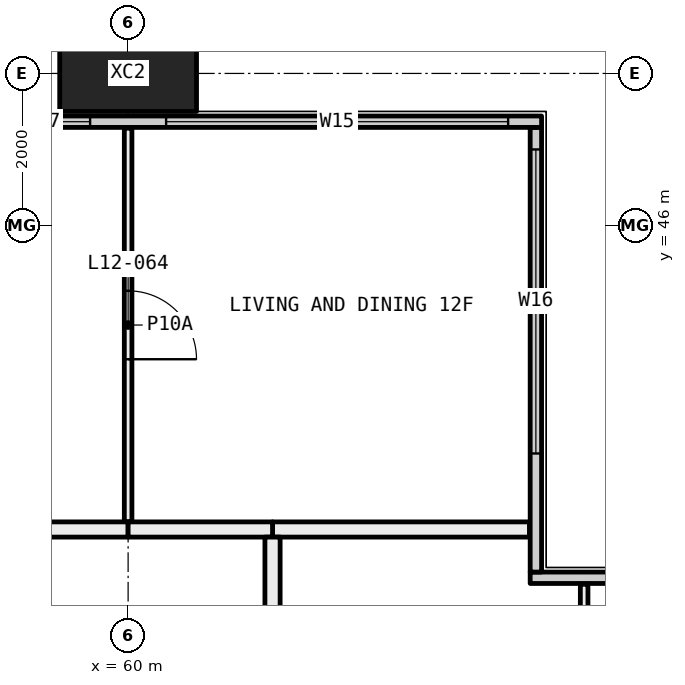
"""IFC4 building model, lengths in metres.
Left out: names, types, materials, properties, quantities, classifications, styles, units other than length and angle.
Written with IfcOpenShell. Run it as: python <this file> out.ifc"""

import sys

from ifc_helpers import new_model, si_unit, direction, frame, frame_2d, origin, origin_2d, place, context, subcontext, project, spatial, rectangle, hollow_rectangle, extrude, element, fill, save


model = new_model("IFC4")
c1 = context("Model", 3, precision=1e-05, world=origin(), true_north=direction((0.0, 1.0)))
c2 = subcontext(c1, "Body", "Model", "MODEL_VIEW")
j1 = project(units=[si_unit("LENGTHUNIT", "METRE"), si_unit("PLANEANGLEUNIT", "RADIAN")], contexts=[c1])
p1 = place(None, origin())
s1 = spatial("IfcSite", under=j1, at=p1, CompositionType="ELEMENT")
p2 = place(p1, origin())
s2 = spatial("IfcBuilding", under=s1, at=p2, CompositionType="ELEMENT")
p3 = place(p2, frame((0.0, 0.0, 54.15)))
s3 = spatial("IfcBuildingStorey", under=s2, at=p3, CompositionType="ELEMENT", Elevation=54.15)
p4 = place(p3, frame((60.0, 48.0, -0.4), z_axis=(0.0, 0.0, 1.0), x_axis=(1.0, 0.0, 0.0)))
e1 = element("IfcColumn", 1, at=p4, inside=s3, PredefinedType="COLUMN", context=c2, shape_type="SweptSolid", body=[
    extrude(hollow_rectangle(XDim=1.8, YDim=1.0, WallThickness=0.07, at=origin_2d()), origin(), (0.0, 0.0, 1.0), 3.45),
])
p5 = place(p3, frame((65.29, 41.365, 0.0), z_axis=(0.0, 0.0, 1.0), x_axis=(1.0, 0.0, 0.0)))
e2 = element("IfcWall", 2, at=p5, inside=s3, PredefinedType="ELEMENTEDWALL", context=c2, shape_type="SweptSolid", body=[
    extrude(rectangle(XDim=6.15, YDim=0.15, at=frame_2d((3.075, 0.0))), origin(), (0.0, 0.0, 1.0), 3.05),
])
p6 = place(p5, frame((1.71, 0.0, 0.45)))
e3 = element("IfcOpeningElement", 3, at=p6, cuts=e2, PredefinedType="OPENING", context=c2, shape_type="SweptSolid", body=[
    extrude(rectangle(XDim=4.0, YDim=2.55, at=frame_2d((2.0, 1.275))), frame((0.0, 0.085, 0.0), z_axis=(0.0, -1.0, 0.0), x_axis=(1.0, 0.0, 0.0)), (0.0, 0.0, 1.0), 0.17),
])
p7 = place(p3, frame((65.365, 41.44, 0.0), z_axis=(0.0, 0.0, 1.0), x_axis=(0.0, 1.0, 0.0)))
e4 = element("IfcWall", 4, at=p7, inside=s3, PredefinedType="ELEMENTEDWALL", context=c2, shape_type="SweptSolid", body=[
    extrude(rectangle(XDim=5.85, YDim=0.15, at=frame_2d((2.925, 0.0))), origin(), (0.0, 0.0, 1.0), 3.05),
])
p8 = place(p7, frame((1.56, 0.0, 0.45)))
e5 = element("IfcOpeningElement", 5, at=p8, cuts=e4, PredefinedType="OPENING", context=c2, shape_type="SweptSolid", body=[
    extrude(rectangle(XDim=4.0, YDim=2.55, at=frame_2d((2.0, 1.275))), frame((0.0, 0.085, 0.0), z_axis=(0.0, -1.0, 0.0), x_axis=(1.0, 0.0, 0.0)), (0.0, 0.0, 1.0), 0.17),
])
p9 = place(p3, frame((6.56, 47.365, 0.0), z_axis=(0.0, 0.0, 1.0), x_axis=(1.0, 0.0, 0.0)))
e6 = element("IfcWall", 6, at=p9, inside=s3, PredefinedType="ELEMENTEDWALL", context=c2, shape_type="SweptSolid", body=[
    extrude(rectangle(XDim=58.88, YDim=0.15, at=frame_2d((29.44, 0.0))), origin(), (0.0, 0.0, 1.0), 3.05),
])
p10 = place(p9, frame((0.44, 0.0, 0.45)))
e7 = element("IfcOpeningElement", 7, at=p10, cuts=e6, PredefinedType="OPENING", context=c2, shape_type="SweptSolid", body=[
    extrude(rectangle(XDim=4.5, YDim=2.55, at=frame_2d((2.25, 1.275))), frame((0.0, 0.085, 0.0), z_axis=(0.0, -1.0, 0.0), x_axis=(1.0, 0.0, 0.0)), (0.0, 0.0, 1.0), 0.17),
])
p11 = place(p9, frame((5.94, 0.0, 0.45)))
e8 = element("IfcOpeningElement", 8, at=p11, cuts=e6, PredefinedType="OPENING", context=c2, shape_type="SweptSolid", body=[
    extrude(rectangle(XDim=1.25, YDim=2.55, at=frame_2d((0.625, 1.275))), frame((0.0, 0.085, 0.0), z_axis=(0.0, -1.0, 0.0), x_axis=(1.0, 0.0, 0.0)), (0.0, 0.0, 1.0), 0.17),
])
p12 = place(p9, frame((9.94, 0.0, 0.45)))
e9 = element("IfcOpeningElement", 9, at=p12, cuts=e6, PredefinedType="OPENING", context=c2, shape_type="SweptSolid", body=[
    extrude(rectangle(XDim=1.0, YDim=2.55, at=frame_2d((0.5, 1.275))), frame((0.0, 0.085, 0.0), z_axis=(0.0, -1.0, 0.0), x_axis=(1.0, 0.0, 0.0)), (0.0, 0.0, 1.0), 0.17),
])
p13 = place(p9, frame((11.94, 0.0, 0.45)))
e10 = element("IfcOpeningElement", 10, at=p13, cuts=e6, PredefinedType="OPENING", context=c2, shape_type="SweptSolid", body=[
    extrude(rectangle(XDim=1.0, YDim=2.55, at=frame_2d((0.5, 1.275))), frame((0.0, 0.085, 0.0), z_axis=(0.0, -1.0, 0.0), x_axis=(1.0, 0.0, 0.0)), (0.0, 0.0, 1.0), 0.17),
])
p14 = place(p9, frame((15.69, 0.0, 0.45)))
e11 = element("IfcOpeningElement", 11, at=p14, cuts=e6, PredefinedType="OPENING", context=c2, shape_type="SweptSolid", body=[
    extrude(rectangle(XDim=1.25, YDim=2.55, at=frame_2d((0.625, 1.275))), frame((0.0, 0.085, 0.0), z_axis=(0.0, -1.0, 0.0), x_axis=(1.0, 0.0, 0.0)), (0.0, 0.0, 1.0), 0.17),
])
p15 = place(p9, frame((17.94, 0.0, 0.45)))
e12 = element("IfcOpeningElement", 12, at=p15, cuts=e6, PredefinedType="OPENING", context=c2, shape_type="SweptSolid", body=[
    extrude(rectangle(XDim=1.25, YDim=2.55, at=frame_2d((0.625, 1.275))), frame((0.0, 0.085, 0.0), z_axis=(0.0, -1.0, 0.0), x_axis=(1.0, 0.0, 0.0)), (0.0, 0.0, 1.0), 0.17),
])
p16 = place(p9, frame((21.94, 0.0, 0.45)))
e13 = element("IfcOpeningElement", 13, at=p16, cuts=e6, PredefinedType="OPENING", context=c2, shape_type="SweptSolid", body=[
    extrude(rectangle(XDim=1.0, YDim=2.55, at=frame_2d((0.5, 1.275))), frame((0.0, 0.085, 0.0), z_axis=(0.0, -1.0, 0.0), x_axis=(1.0, 0.0, 0.0)), (0.0, 0.0, 1.0), 0.17),
])
p17 = place(p9, frame((23.94, 0.0, 0.45)))
e14 = element("IfcOpeningElement", 14, at=p17, cuts=e6, PredefinedType="OPENING", context=c2, shape_type="SweptSolid", body=[
    extrude(rectangle(XDim=1.0, YDim=2.55, at=frame_2d((0.5, 1.275))), frame((0.0, 0.085, 0.0), z_axis=(0.0, -1.0, 0.0), x_axis=(1.0, 0.0, 0.0)), (0.0, 0.0, 1.0), 0.17),
])
p18 = place(p9, frame((27.69, 0.0, 0.45)))
e15 = element("IfcOpeningElement", 15, at=p18, cuts=e6, PredefinedType="OPENING", context=c2, shape_type="SweptSolid", body=[
    extrude(rectangle(XDim=1.25, YDim=2.55, at=frame_2d((0.625, 1.275))), frame((0.0, 0.085, 0.0), z_axis=(0.0, -1.0, 0.0), x_axis=(1.0, 0.0, 0.0)), (0.0, 0.0, 1.0), 0.17),
])
p19 = place(p9, frame((29.94, 0.0, 0.45)))
e16 = element("IfcOpeningElement", 16, at=p19, cuts=e6, PredefinedType="OPENING", context=c2, shape_type="SweptSolid", body=[
    extrude(rectangle(XDim=1.25, YDim=2.55, at=frame_2d((0.625, 1.275))), frame((0.0, 0.085, 0.0), z_axis=(0.0, -1.0, 0.0), x_axis=(1.0, 0.0, 0.0)), (0.0, 0.0, 1.0), 0.17),
])
p20 = place(p9, frame((33.94, 0.0, 0.45)))
e17 = element("IfcOpeningElement", 17, at=p20, cuts=e6, PredefinedType="OPENING", context=c2, shape_type="SweptSolid", body=[
    extrude(rectangle(XDim=1.0, YDim=2.55, at=frame_2d((0.5, 1.275))), frame((0.0, 0.085, 0.0), z_axis=(0.0, -1.0, 0.0), x_axis=(1.0, 0.0, 0.0)), (0.0, 0.0, 1.0), 0.17),
])
p21 = place(p9, frame((35.94, 0.0, 0.45)))
e18 = element("IfcOpeningElement", 18, at=p21, cuts=e6, PredefinedType="OPENING", context=c2, shape_type="SweptSolid", body=[
    extrude(rectangle(XDim=1.0, YDim=2.55, at=frame_2d((0.5, 1.275))), frame((0.0, 0.085, 0.0), z_axis=(0.0, -1.0, 0.0), x_axis=(1.0, 0.0, 0.0)), (0.0, 0.0, 1.0), 0.17),
])
p22 = place(p9, frame((39.69, 0.0, 0.45)))
e19 = element("IfcOpeningElement", 19, at=p22, cuts=e6, PredefinedType="OPENING", context=c2, shape_type="SweptSolid", body=[
    extrude(rectangle(XDim=1.25, YDim=2.55, at=frame_2d((0.625, 1.275))), frame((0.0, 0.085, 0.0), z_axis=(0.0, -1.0, 0.0), x_axis=(1.0, 0.0, 0.0)), (0.0, 0.0, 1.0), 0.17),
])
p23 = place(p9, frame((41.94, 0.0, 0.45)))
e20 = element("IfcOpeningElement", 20, at=p23, cuts=e6, PredefinedType="OPENING", context=c2, shape_type="SweptSolid", body=[
    extrude(rectangle(XDim=1.25, YDim=2.55, at=frame_2d((0.625, 1.275))), frame((0.0, 0.085, 0.0), z_axis=(0.0, -1.0, 0.0), x_axis=(1.0, 0.0, 0.0)), (0.0, 0.0, 1.0), 0.17),
])
p24 = place(p9, frame((45.94, 0.0, 0.45)))
e21 = element("IfcOpeningElement", 21, at=p24, cuts=e6, PredefinedType="OPENING", context=c2, shape_type="SweptSolid", body=[
    extrude(rectangle(XDim=1.0, YDim=2.55, at=frame_2d((0.5, 1.275))), frame((0.0, 0.085, 0.0), z_axis=(0.0, -1.0, 0.0), x_axis=(1.0, 0.0, 0.0)), (0.0, 0.0, 1.0), 0.17),
])
p25 = place(p9, frame((47.94, 0.0, 0.45)))
e22 = element("IfcOpeningElement", 22, at=p25, cuts=e6, PredefinedType="OPENING", context=c2, shape_type="SweptSolid", body=[
    extrude(rectangle(XDim=1.0, YDim=2.55, at=frame_2d((0.5, 1.275))), frame((0.0, 0.085, 0.0), z_axis=(0.0, -1.0, 0.0), x_axis=(1.0, 0.0, 0.0)), (0.0, 0.0, 1.0), 0.17),
])
p26 = place(p9, frame((51.69, 0.0, 0.45)))
e23 = element("IfcOpeningElement", 23, at=p26, cuts=e6, PredefinedType="OPENING", context=c2, shape_type="SweptSolid", body=[
    extrude(rectangle(XDim=1.25, YDim=2.55, at=frame_2d((0.625, 1.275))), frame((0.0, 0.085, 0.0), z_axis=(0.0, -1.0, 0.0), x_axis=(1.0, 0.0, 0.0)), (0.0, 0.0, 1.0), 0.17),
])
p27 = place(p9, frame((53.94, 0.0, 0.45)))
e24 = element("IfcOpeningElement", 24, at=p27, cuts=e6, PredefinedType="OPENING", context=c2, shape_type="SweptSolid", body=[
    extrude(rectangle(XDim=4.5, YDim=2.55, at=frame_2d((2.25, 1.275))), frame((0.0, 0.085, 0.0), z_axis=(0.0, -1.0, 0.0), x_axis=(1.0, 0.0, 0.0)), (0.0, 0.0, 1.0), 0.17),
])
p28 = place(p3, frame((60.0, 42.1, 0.0), z_axis=(0.0, 0.0, 1.0), x_axis=(0.0, 1.0, 0.0)))
e25 = element("IfcWall", 25, at=p28, inside=s3, PredefinedType="PARTITIONING", context=c2, shape_type="SweptSolid", body=[
    extrude(rectangle(XDim=5.18, YDim=0.1, at=frame_2d((2.59, 0.0))), origin(), (0.0, 0.0, 1.0), 3.05),
])
p29 = place(p28, frame((2.14, 0.0, 0.0)))
e26 = element("IfcOpeningElement", 26, at=p29, cuts=e25, PredefinedType="OPENING", context=c2, shape_type="SweptSolid", body=[
    extrude(rectangle(XDim=0.9, YDim=2.1, at=frame_2d((0.45, 1.05))), frame((0.0, 0.06, 0.0), z_axis=(0.0, -1.0, 0.0), x_axis=(1.0, 0.0, 0.0)), (0.0, 0.0, 1.0), 0.12),
])
p30 = place(p3, frame((54.0, 42.0, 0.0), z_axis=(0.0, 0.0, 1.0), x_axis=(1.0, 0.0, 0.0)))
e27 = element("IfcWall", 27, at=p30, inside=s3, PredefinedType="PARTITIONING", context=c2, shape_type="SweptSolid", body=[
    extrude(rectangle(XDim=6.0, YDim=0.2, at=frame_2d((3.0, 0.0))), origin(), (0.0, 0.0, 1.0), 3.05),
])
p31 = place(p30, frame((2.5, 0.0, 0.0)))
e28 = element("IfcOpeningElement", 28, at=p31, cuts=e27, PredefinedType="OPENING", context=c2, shape_type="SweptSolid", body=[
    extrude(rectangle(XDim=1.0, YDim=2.1, at=frame_2d((0.5, 1.05))), frame((0.0, 0.11, 0.0), z_axis=(0.0, -1.0, 0.0), x_axis=(1.0, 0.0, 0.0)), (0.0, 0.0, 1.0), 0.22),
])
p32 = place(p3, frame((61.9, 42.0, 0.0), z_axis=(0.0, 0.0, 1.0), x_axis=(1.0, 0.0, 0.0)))
e29 = element("IfcWall", 29, at=p32, inside=s3, PredefinedType="PARTITIONING", context=c2, shape_type="SweptSolid", body=[
    extrude(rectangle(XDim=3.38, YDim=0.2, at=frame_2d((1.69, 0.0))), origin(), (0.0, 0.0, 1.0), 3.05),
])
p33 = place(p3, frame((60.0, 42.0, 0.0), z_axis=(0.0, 0.0, 1.0), x_axis=(1.0, 0.0, 0.0)))
e30 = element("IfcWall", 30, at=p33, inside=s3, PredefinedType="PARTITIONING", context=c2, shape_type="SweptSolid", body=[
    extrude(rectangle(XDim=1.9, YDim=0.2, at=frame_2d((0.95, 0.0))), origin(), (0.0, 0.0, 1.0), 3.05),
])
p34 = place(p3, frame((66.0, 41.28, 0.0), z_axis=(0.0, 0.0, 1.0), x_axis=(0.0, -1.0, 0.0)))
e31 = element("IfcWall", 31, at=p34, inside=s3, PredefinedType="PARTITIONING", context=c2, shape_type="SweptSolid", body=[
    extrude(rectangle(XDim=3.78, YDim=0.1, at=frame_2d((1.89, 0.0))), origin(), (0.0, 0.0, 1.0), 3.05),
])
p35 = place(p3, frame((61.9, 41.9, 0.0), z_axis=(0.0, 0.0, 1.0), x_axis=(0.0, -1.0, 0.0)))
e32 = element("IfcWall", 32, at=p35, inside=s3, PredefinedType="PARTITIONING", context=c2, shape_type="SweptSolid", body=[
    extrude(rectangle(XDim=4.4, YDim=0.2, at=frame_2d((2.2, 0.0))), origin(), (0.0, 0.0, 1.0), 3.05),
])
p36 = place(p8, origin())
e33 = element("IfcWindow", 33, at=p36, inside=s3, PartitioningType="SINGLE_PANEL", PredefinedType="WINDOW", context=c2, shape_type="SweptSolid", body=[
    extrude(rectangle(XDim=4.0, YDim=2.55, at=frame_2d((2.0, 1.275))), frame((0.0, 0.03, 0.0), z_axis=(0.0, -1.0, 0.0), x_axis=(1.0, 0.0, 0.0)), (0.0, 0.0, 1.0), 0.06),
])
fill(e5, e33)
p37 = place(p26, origin())
e34 = element("IfcWindow", 34, at=p37, inside=s3, PartitioningType="SINGLE_PANEL", PredefinedType="WINDOW", context=c2, shape_type="SweptSolid", body=[
    extrude(rectangle(XDim=1.25, YDim=2.55, at=frame_2d((0.625, 1.275))), frame((0.0, 0.03, 0.0), z_axis=(0.0, -1.0, 0.0), x_axis=(1.0, 0.0, 0.0)), (0.0, 0.0, 1.0), 0.06),
])
fill(e23, e34)
p38 = place(p27, origin())
e35 = element("IfcWindow", 35, at=p38, inside=s3, PartitioningType="SINGLE_PANEL", PredefinedType="WINDOW", context=c2, shape_type="SweptSolid", body=[
    extrude(rectangle(XDim=4.5, YDim=2.55, at=frame_2d((2.25, 1.275))), frame((0.0, 0.03, 0.0), z_axis=(0.0, -1.0, 0.0), x_axis=(1.0, 0.0, 0.0)), (0.0, 0.0, 1.0), 0.06),
])
fill(e24, e35)
p39 = place(p29, frame((0.9, 0.0, 0.0), x_axis=(-1.0, 0.0, 0.0)))
e36 = element("IfcDoor", 36, at=p39, inside=s3, OperationType="SINGLE_SWING_LEFT", PredefinedType="DOOR", context=c2, shape_type="SweptSolid", body=[
    extrude(rectangle(XDim=0.9, YDim=2.1, at=frame_2d((0.45, 1.05))), frame((0.0, 0.025, 0.0), z_axis=(0.0, -1.0, 0.0), x_axis=(1.0, 0.0, 0.0)), (0.0, 0.0, 1.0), 0.05),
])
fill(e26, e36)
save(model, sys.argv[1])
